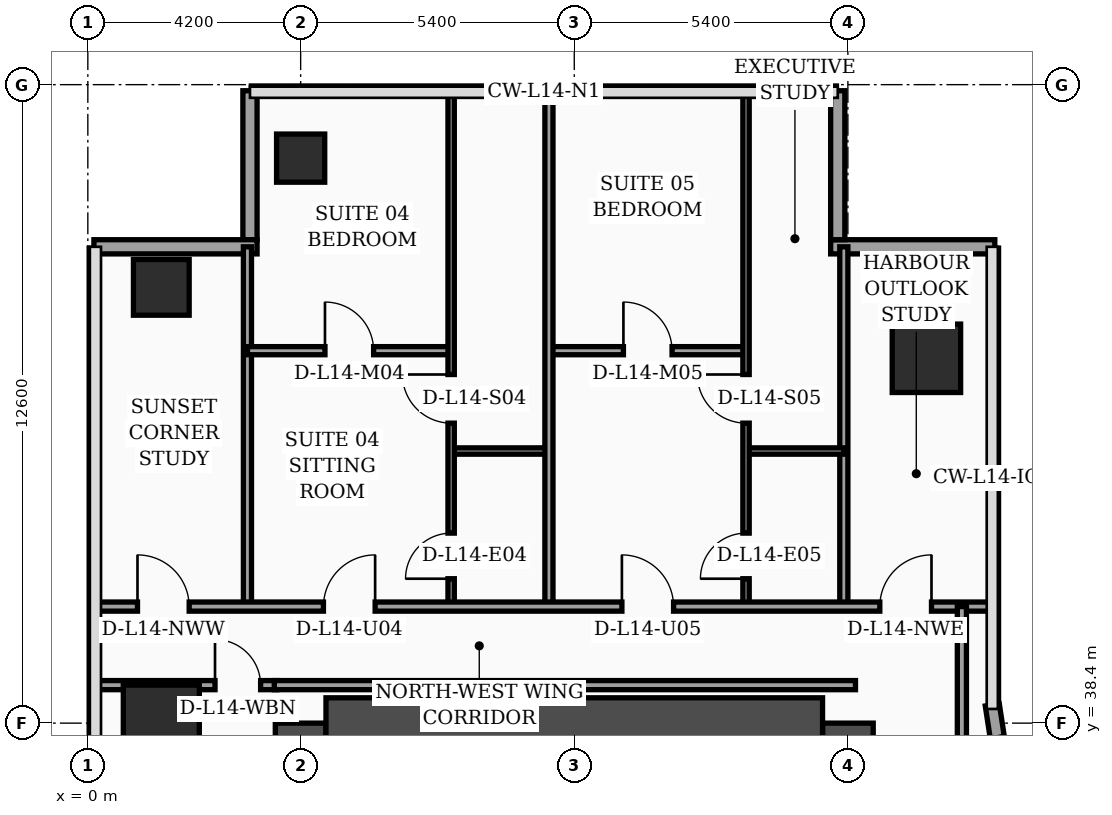
"""IFC4 building model, lengths in metres.
Left out: names, types, materials, properties, quantities, classifications, styles, units other than length and angle.
Written with IfcOpenShell. Run it as: python <this file> out.ifc"""

import sys

from ifc_helpers import new_model, si_unit, direction, frame, frame_2d, origin, origin_2d, place, context, subcontext, project, spatial, rectangle, hollow_rectangle, extrude, element, fill, save


model = new_model("IFC4")
c1 = context("Model", 3, precision=1e-05, world=origin(), true_north=direction((0.0, 1.0)))
c2 = subcontext(c1, "Body", "Model", "MODEL_VIEW")
j1 = project(units=[si_unit("LENGTHUNIT", "METRE"), si_unit("PLANEANGLEUNIT", "RADIAN")], contexts=[c1])
p1 = place(None, origin())
s1 = spatial("IfcSite", under=j1, at=p1, CompositionType="ELEMENT")
p2 = place(p1, origin())
s2 = spatial("IfcBuilding", under=s1, at=p2, CompositionType="ELEMENT")
p3 = place(p2, frame((0.0, 0.0, 62.2)))
s3 = spatial("IfcBuildingStorey", under=s2, at=p3, CompositionType="ELEMENT", Elevation=62.2)
p4 = place(p3, frame((4.2, 16.8, 0.0), z_axis=(0.0, 0.0, 1.0), x_axis=(0.0, 1.0, 0.0)))
e1 = element("IfcWall", 1, at=p4, inside=s3, PredefinedType="SHEAR", context=c2, shape_type="SweptSolid", body=[
    extrude(rectangle(XDim=21.6, YDim=1.0, at=frame_2d((10.8, 0.0))), origin(), (0.0, 0.0, 1.0), 3.56),
])
p5 = place(p3, frame((15.0, 16.8, 0.0), z_axis=(0.0, 0.0, 1.0), x_axis=(0.0, 1.0, 0.0)))
e2 = element("IfcWall", 2, at=p5, inside=s3, PredefinedType="SHEAR", context=c2, shape_type="SweptSolid", body=[
    extrude(rectangle(XDim=21.6, YDim=1.0, at=frame_2d((10.8, 0.0))), origin(), (0.0, 0.0, 1.0), 3.56),
])
p6 = place(p5, frame((8.65, 0.0, 0.0)))
e3 = element("IfcOpeningElement", 3, at=p6, cuts=e2, PredefinedType="OPENING", context=c2, shape_type="SweptSolid", body=[
    extrude(rectangle(XDim=1.1, YDim=2.2, at=frame_2d((0.55, 1.1))), frame((0.0, 0.51, 0.0), z_axis=(0.0, -1.0, 0.0), x_axis=(1.0, 0.0, 0.0)), (0.0, 0.0, 1.0), 1.02),
])
p7 = place(p5, frame((1.25, 0.0, 0.0)))
e4 = element("IfcOpeningElement", 4, at=p7, cuts=e2, PredefinedType="OPENING", context=c2, shape_type="SweptSolid", body=[
    extrude(rectangle(XDim=1.1, YDim=2.2, at=frame_2d((0.55, 1.1))), frame((0.0, 0.51, 0.0), z_axis=(0.0, -1.0, 0.0), x_axis=(1.0, 0.0, 0.0)), (0.0, 0.0, 1.0), 1.02),
])
p8 = place(p5, frame((3.8, 0.0, 0.0)))
e5 = element("IfcOpeningElement", 5, at=p8, cuts=e2, PredefinedType="OPENING", context=c2, shape_type="SweptSolid", body=[
    extrude(rectangle(XDim=1.1, YDim=2.2, at=frame_2d((0.55, 1.1))), frame((0.0, 0.51, 0.0), z_axis=(0.0, -1.0, 0.0), x_axis=(1.0, 0.0, 0.0)), (0.0, 0.0, 1.0), 1.02),
])
p9 = place(p5, frame((6.35, 0.0, 0.0)))
e6 = element("IfcOpeningElement", 6, at=p9, cuts=e2, PredefinedType="OPENING", context=c2, shape_type="SweptSolid", body=[
    extrude(rectangle(XDim=1.1, YDim=2.2, at=frame_2d((0.55, 1.1))), frame((0.0, 0.51, 0.0), z_axis=(0.0, -1.0, 0.0), x_axis=(1.0, 0.0, 0.0)), (0.0, 0.0, 1.0), 1.02),
])
p10 = place(p3, frame((4.7, 38.4, 0.0), z_axis=(0.0, 0.0, 1.0), x_axis=(1.0, 0.0, 0.0)))
e7 = element("IfcWall", 7, at=p10, inside=s3, PredefinedType="SHEAR", context=c2, shape_type="SweptSolid", body=[
    extrude(rectangle(XDim=9.8, YDim=1.0, at=frame_2d((4.9, 0.0))), origin(), (0.0, 0.0, 1.0), 3.56),
])
p11 = place(p3, frame((1.45, 38.4, 0.0), z_axis=(0.0, 0.0, 1.0), x_axis=(1.0, 0.0, 0.0)))
e8 = element("IfcColumn", 8, at=p11, inside=s3, PredefinedType="COLUMN", context=c2, shape_type="SweptSolid", body=[
    extrude(rectangle(XDim=1.5, YDim=1.5, at=origin_2d()), origin(), (0.0, 0.0, 1.0), 3.56),
])
p12 = place(p3, frame((1.45, 47.0, 0.0), z_axis=(0.0, 0.0, 1.0), x_axis=(1.0, 0.0, 0.0)))
e9 = element("IfcColumn", 9, at=p12, inside=s3, PredefinedType="COLUMN", context=c2, shape_type="SweptSolid", body=[
    extrude(hollow_rectangle(XDim=1.1, YDim=1.1, WallThickness=0.045, at=origin_2d()), origin(), (0.0, 0.0, 1.0), 3.56),
])
p13 = place(p3, frame((4.2, 49.55, 0.0), z_axis=(0.0, 0.0, 1.0), x_axis=(1.0, 0.0, 0.0)))
e10 = element("IfcColumn", 10, at=p13, inside=s3, PredefinedType="COLUMN", context=c2, shape_type="SweptSolid", body=[
    extrude(hollow_rectangle(XDim=0.95, YDim=0.95, WallThickness=0.04, at=origin_2d()), origin(), (0.0, 0.0, 1.0), 3.56),
])
p14 = place(p3, frame((16.55, 45.6, 0.0), z_axis=(0.0, 0.0, 1.0), x_axis=(1.0, 0.0, 0.0)))
e11 = element("IfcColumn", 11, at=p14, inside=s3, PredefinedType="COLUMN", context=c2, shape_type="SweptSolid", body=[
    extrude(rectangle(XDim=1.35, YDim=1.35, at=origin_2d()), origin(), (0.0, 0.0, 1.0), 3.56),
])
p15 = place(p3, frame((17.962, 38.03, 0.0), z_axis=(0.0, 0.0, 1.0), x_axis=(-0.15141125477, 0.988470855377, 0.0)))
e12 = element("IfcWall", 12, at=p15, inside=s3, PredefinedType="SOLIDWALL", context=c2, shape_type="SweptSolid", body=[
    extrude(rectangle(XDim=0.739, YDim=0.28, at=frame_2d((0.369, 0.0))), origin(), (0.0, 0.0, 1.0), 3.56),
])
p16 = place(p3, frame((17.9, 47.8, 0.0), z_axis=(0.0, 0.0, 1.0), x_axis=(-1.0, 0.0, 0.0)))
e13 = element("IfcWall", 13, at=p16, inside=s3, PredefinedType="SOLIDWALL", context=c2, shape_type="SweptSolid", body=[
    extrude(rectangle(XDim=3.24, YDim=0.28, at=frame_2d((1.62, 0.0))), origin(), (0.0, 0.0, 1.0), 3.56),
])
p17 = place(p3, frame((14.8, 47.94, 0.0), z_axis=(0.0, 0.0, 1.0), x_axis=(0.0, 1.0, 0.0)))
e14 = element("IfcWall", 14, at=p17, inside=s3, PredefinedType="SOLIDWALL", context=c2, shape_type="SweptSolid", body=[
    extrude(rectangle(XDim=2.94, YDim=0.28, at=frame_2d((1.47, 0.0))), origin(), (0.0, 0.0, 1.0), 3.56),
])
p18 = place(p3, frame((3.2, 50.88, 0.0), z_axis=(0.0, 0.0, 1.0), x_axis=(0.0, -1.0, 0.0)))
e15 = element("IfcWall", 15, at=p18, inside=s3, PredefinedType="SOLIDWALL", context=c2, shape_type="SweptSolid", body=[
    extrude(rectangle(XDim=2.94, YDim=0.28, at=frame_2d((1.47, 0.0))), origin(), (0.0, 0.0, 1.0), 3.04),
])
p19 = place(p3, frame((3.34, 47.8, 0.0), z_axis=(0.0, 0.0, 1.0), x_axis=(-1.0, 0.0, 0.0)))
e16 = element("IfcWall", 16, at=p19, inside=s3, PredefinedType="SOLIDWALL", context=c2, shape_type="SweptSolid", body=[
    extrude(rectangle(XDim=3.22, YDim=0.28, at=frame_2d((1.61, 0.0))), origin(), (0.0, 0.0, 1.0), 3.04),
])
p20 = place(p3, frame((0.08, 39.15, 0.0), z_axis=(0.0, 0.0, 1.0), x_axis=(1.0, 0.0, 0.0)))
e17 = element("IfcWall", 17, at=p20, inside=s3, PredefinedType="PARTITIONING", context=c2, shape_type="SweptSolid", body=[
    extrude(rectangle(XDim=3.65, YDim=0.18, at=frame_2d((1.825, 0.0))), origin(), (0.0, 0.0, 1.0), 2.84),
])
p21 = place(p20, frame((2.43, 0.0, 0.0)))
e18 = element("IfcOpeningElement", 18, at=p21, cuts=e17, PredefinedType="OPENING", context=c2, shape_type="SweptSolid", body=[
    extrude(rectangle(XDim=0.9, YDim=2.15, at=frame_2d((0.45, 1.075))), frame((0.0, 0.1, 0.0), z_axis=(0.0, -1.0, 0.0), x_axis=(1.0, 0.0, 0.0)), (0.0, 0.0, 1.0), 0.2),
])
p22 = place(p3, frame((3.15, 40.7, 0.0), z_axis=(0.0, 0.0, 1.0), x_axis=(0.0, 1.0, 0.0)))
e19 = element("IfcWall", 19, at=p22, inside=s3, PredefinedType="PARTITIONING", context=c2, shape_type="SweptSolid", body=[
    extrude(rectangle(XDim=7.1, YDim=0.16, at=frame_2d((3.55, 0.0))), origin(), (0.0, 0.0, 1.0), 3.14),
])
p23 = place(p3, frame((14.92, 40.7, 0.0), z_axis=(0.0, 0.0, 1.0), x_axis=(0.0, 1.0, 0.0)))
e20 = element("IfcWall", 20, at=p23, inside=s3, PredefinedType="PARTITIONING", context=c2, shape_type="SweptSolid", body=[
    extrude(rectangle(XDim=7.1, YDim=0.16, at=frame_2d((3.55, 0.0))), origin(), (0.0, 0.0, 1.0), 3.04),
])
p24 = place(p3, frame((7.17, 43.77, 0.0), z_axis=(0.0, 0.0, 1.0), x_axis=(1.0, 0.0, 0.0)))
e21 = element("IfcWall", 21, at=p24, inside=s3, PredefinedType="PARTITIONING", context=c2, shape_type="SweptSolid", body=[
    extrude(rectangle(XDim=1.93, YDim=0.125, at=frame_2d((0.965, 0.0))), origin(), (0.0, 0.0, 1.0), 3.56),
])
p25 = place(p3, frame((3.15, 45.75, 0.0), z_axis=(0.0, 0.0, 1.0), x_axis=(1.0, 0.0, 0.0)))
e22 = element("IfcWall", 22, at=p25, inside=s3, PredefinedType="PARTITIONING", context=c2, shape_type="SweptSolid", body=[
    extrude(rectangle(XDim=4.02, YDim=0.16, at=frame_2d((2.01, 0.0))), origin(), (0.0, 0.0, 1.0), 2.84),
])
p26 = place(p25, frame((1.53, 0.0, 0.0)))
e23 = element("IfcOpeningElement", 23, at=p26, cuts=e22, PredefinedType="OPENING", context=c2, shape_type="SweptSolid", body=[
    extrude(rectangle(XDim=0.96, YDim=2.2, at=frame_2d((0.48, 1.1))), frame((0.0, 0.09, 0.0), z_axis=(0.0, -1.0, 0.0), x_axis=(1.0, 0.0, 0.0)), (0.0, 0.0, 1.0), 0.18),
])
p27 = place(p3, frame((7.17, 40.7, 0.0), z_axis=(0.0, 0.0, 1.0), x_axis=(0.0, 1.0, 0.0)))
e24 = element("IfcWall", 24, at=p27, inside=s3, PredefinedType="PARTITIONING", context=c2, shape_type="SweptSolid", body=[
    extrude(rectangle(XDim=10.24, YDim=0.125, at=frame_2d((5.12, 0.0))), origin(), (0.0, 0.0, 1.0), 3.04),
])
p28 = place(p27, frame((0.55, 0.0, 0.0)))
e25 = element("IfcOpeningElement", 25, at=p28, cuts=e24, PredefinedType="OPENING", context=c2, shape_type="SweptSolid", body=[
    extrude(rectangle(XDim=0.9, YDim=2.15, at=frame_2d((0.45, 1.075))), frame((0.0, 0.073, 0.0), z_axis=(0.0, -1.0, 0.0), x_axis=(1.0, 0.0, 0.0)), (0.0, 0.0, 1.0), 0.145),
])
p29 = place(p27, frame((3.62, 0.0, 0.0)))
e26 = element("IfcOpeningElement", 26, at=p29, cuts=e24, PredefinedType="OPENING", context=c2, shape_type="SweptSolid", body=[
    extrude(rectangle(XDim=0.96, YDim=2.2, at=frame_2d((0.48, 1.1))), frame((0.0, 0.073, 0.0), z_axis=(0.0, -1.0, 0.0), x_axis=(1.0, 0.0, 0.0)), (0.0, 0.0, 1.0), 0.145),
])
p30 = place(p3, frame((12.99, 43.77, 0.0), z_axis=(0.0, 0.0, 1.0), x_axis=(1.0, 0.0, 0.0)))
e27 = element("IfcWall", 27, at=p30, inside=s3, PredefinedType="PARTITIONING", context=c2, shape_type="SweptSolid", body=[
    extrude(rectangle(XDim=1.93, YDim=0.125, at=frame_2d((0.965, 0.0))), origin(), (0.0, 0.0, 1.0), 3.56),
])
p31 = place(p3, frame((9.1, 45.75, 0.0), z_axis=(0.0, 0.0, 1.0), x_axis=(1.0, 0.0, 0.0)))
e28 = element("IfcWall", 28, at=p31, inside=s3, PredefinedType="PARTITIONING", context=c2, shape_type="SweptSolid", body=[
    extrude(rectangle(XDim=3.89, YDim=0.16, at=frame_2d((1.945, 0.0))), origin(), (0.0, 0.0, 1.0), 3.56),
])
p32 = place(p31, frame((1.47, 0.0, 0.0)))
e29 = element("IfcOpeningElement", 29, at=p32, cuts=e28, PredefinedType="OPENING", context=c2, shape_type="SweptSolid", body=[
    extrude(rectangle(XDim=0.96, YDim=2.2, at=frame_2d((0.48, 1.1))), frame((0.0, 0.09, 0.0), z_axis=(0.0, -1.0, 0.0), x_axis=(1.0, 0.0, 0.0)), (0.0, 0.0, 1.0), 0.18),
])
p33 = place(p3, frame((12.99, 40.7, 0.0), z_axis=(0.0, 0.0, 1.0), x_axis=(0.0, 1.0, 0.0)))
e30 = element("IfcWall", 30, at=p33, inside=s3, PredefinedType="PARTITIONING", context=c2, shape_type="SweptSolid", body=[
    extrude(rectangle(XDim=10.24, YDim=0.125, at=frame_2d((5.12, 0.0))), origin(), (0.0, 0.0, 1.0), 3.04),
])
p34 = place(p33, frame((0.55, 0.0, 0.0)))
e31 = element("IfcOpeningElement", 31, at=p34, cuts=e30, PredefinedType="OPENING", context=c2, shape_type="SweptSolid", body=[
    extrude(rectangle(XDim=0.9, YDim=2.15, at=frame_2d((0.45, 1.075))), frame((0.0, 0.073, 0.0), z_axis=(0.0, -1.0, 0.0), x_axis=(1.0, 0.0, 0.0)), (0.0, 0.0, 1.0), 0.145),
])
p35 = place(p33, frame((3.62, 0.0, 0.0)))
e32 = element("IfcOpeningElement", 32, at=p35, cuts=e30, PredefinedType="OPENING", context=c2, shape_type="SweptSolid", body=[
    extrude(rectangle(XDim=0.96, YDim=2.2, at=frame_2d((0.48, 1.1))), frame((0.0, 0.073, 0.0), z_axis=(0.0, -1.0, 0.0), x_axis=(1.0, 0.0, 0.0)), (0.0, 0.0, 1.0), 0.145),
])
p36 = place(p3, frame((9.1, 40.7, 0.0), z_axis=(0.0, 0.0, 1.0), x_axis=(0.0, 1.0, 0.0)))
e33 = element("IfcWall", 33, at=p36, inside=s3, PredefinedType="PARTITIONING", context=c2, shape_type="SweptSolid", body=[
    extrude(rectangle(XDim=10.24, YDim=0.16, at=frame_2d((5.12, 0.0))), origin(), (0.0, 0.0, 1.0), 3.04),
])
p37 = place(p3, frame((0.08, 40.7, 0.0), z_axis=(0.0, 0.0, 1.0), x_axis=(1.0, 0.0, 0.0)))
e34 = element("IfcWall", 34, at=p37, inside=s3, PredefinedType="PARTITIONING", context=c2, shape_type="SweptSolid", body=[
    extrude(rectangle(XDim=17.77, YDim=0.18, at=frame_2d((8.885, 0.0))), origin(), (0.0, 0.0, 1.0), 2.84),
])
p38 = place(p37, frame((0.9, 0.0, 0.0)))
e35 = element("IfcOpeningElement", 35, at=p38, cuts=e34, PredefinedType="OPENING", context=c2, shape_type="SweptSolid", body=[
    extrude(rectangle(XDim=1.02, YDim=2.2, at=frame_2d((0.51, 1.1))), frame((0.0, 0.1, 0.0), z_axis=(0.0, -1.0, 0.0), x_axis=(1.0, 0.0, 0.0)), (0.0, 0.0, 1.0), 0.2),
])
p39 = place(p37, frame((4.57, 0.0, 0.0)))
e36 = element("IfcOpeningElement", 36, at=p39, cuts=e34, PredefinedType="OPENING", context=c2, shape_type="SweptSolid", body=[
    extrude(rectangle(XDim=1.02, YDim=2.2, at=frame_2d((0.51, 1.1))), frame((0.0, 0.1, 0.0), z_axis=(0.0, -1.0, 0.0), x_axis=(1.0, 0.0, 0.0)), (0.0, 0.0, 1.0), 0.2),
])
p40 = place(p37, frame((10.46, 0.0, 0.0)))
e37 = element("IfcOpeningElement", 37, at=p40, cuts=e34, PredefinedType="OPENING", context=c2, shape_type="SweptSolid", body=[
    extrude(rectangle(XDim=1.02, YDim=2.2, at=frame_2d((0.51, 1.1))), frame((0.0, 0.1, 0.0), z_axis=(0.0, -1.0, 0.0), x_axis=(1.0, 0.0, 0.0)), (0.0, 0.0, 1.0), 0.2),
])
p41 = place(p37, frame((15.55, 0.0, 0.0)))
e38 = element("IfcOpeningElement", 38, at=p41, cuts=e34, PredefinedType="OPENING", context=c2, shape_type="SweptSolid", body=[
    extrude(rectangle(XDim=1.02, YDim=2.2, at=frame_2d((0.51, 1.1))), frame((0.0, 0.1, 0.0), z_axis=(0.0, -1.0, 0.0), x_axis=(1.0, 0.0, 0.0)), (0.0, 0.0, 1.0), 0.2),
])
p42 = place(p3, frame((17.25, 24.3, 0.0), z_axis=(0.0, 0.0, 1.0), x_axis=(0.0, 1.0, 0.0)))
e39 = element("IfcWall", 39, at=p42, inside=s3, PredefinedType="PARTITIONING", context=c2, shape_type="SweptSolid", body=[
    extrude(rectangle(XDim=16.4, YDim=0.18, at=frame_2d((8.2, 0.0))), origin(), (0.0, 0.0, 1.0), 2.84),
])
p43 = place(p3, frame((3.68, 39.15, 0.0), z_axis=(0.0, 0.0, 1.0), x_axis=(1.0, 0.0, 0.0)))
e40 = element("IfcWall", 40, at=p43, inside=s3, PredefinedType="PARTITIONING", context=c2, shape_type="SweptSolid", body=[
    extrude(rectangle(XDim=11.47, YDim=0.18, at=frame_2d((5.735, 0.0))), origin(), (0.0, 0.0, 1.0), 2.84),
])
p44 = place(p21, origin())
e41 = element("IfcDoor", 41, at=p44, inside=s3, OperationType="SINGLE_SWING_LEFT", PredefinedType="DOOR", context=c2, shape_type="SweptSolid", body=[
    extrude(rectangle(XDim=0.9, YDim=2.15, at=frame_2d((0.45, 1.075))), frame((0.0, 0.025, 0.0), z_axis=(0.0, -1.0, 0.0), x_axis=(1.0, 0.0, 0.0)), (0.0, 0.0, 1.0), 0.05),
])
fill(e18, e41)
p45 = place(p26, origin())
e42 = element("IfcDoor", 42, at=p45, inside=s3, OperationType="SINGLE_SWING_LEFT", PredefinedType="DOOR", context=c2, shape_type="SweptSolid", body=[
    extrude(rectangle(XDim=0.96, YDim=2.2, at=frame_2d((0.48, 1.1))), frame((0.0, 0.025, 0.0), z_axis=(0.0, -1.0, 0.0), x_axis=(1.0, 0.0, 0.0)), (0.0, 0.0, 1.0), 0.05),
])
fill(e23, e42)
p46 = place(p28, origin())
e43 = element("IfcDoor", 43, at=p46, inside=s3, OperationType="SINGLE_SWING_LEFT", PredefinedType="DOOR", context=c2, shape_type="SweptSolid", body=[
    extrude(rectangle(XDim=0.9, YDim=2.15, at=frame_2d((0.45, 1.075))), frame((0.0, 0.025, 0.0), z_axis=(0.0, -1.0, 0.0), x_axis=(1.0, 0.0, 0.0)), (0.0, 0.0, 1.0), 0.05),
])
fill(e25, e43)
p47 = place(p29, origin())
e44 = element("IfcDoor", 44, at=p47, inside=s3, OperationType="SINGLE_SWING_RIGHT", PredefinedType="DOOR", context=c2, shape_type="SweptSolid", body=[
    extrude(rectangle(XDim=0.96, YDim=2.2, at=frame_2d((0.48, 1.1))), frame((0.0, 0.025, 0.0), z_axis=(0.0, -1.0, 0.0), x_axis=(1.0, 0.0, 0.0)), (0.0, 0.0, 1.0), 0.05),
])
fill(e26, e44)
p48 = place(p32, origin())
e45 = element("IfcDoor", 45, at=p48, inside=s3, OperationType="SINGLE_SWING_LEFT", PredefinedType="DOOR", context=c2, shape_type="SweptSolid", body=[
    extrude(rectangle(XDim=0.96, YDim=2.2, at=frame_2d((0.48, 1.1))), frame((0.0, 0.025, 0.0), z_axis=(0.0, -1.0, 0.0), x_axis=(1.0, 0.0, 0.0)), (0.0, 0.0, 1.0), 0.05),
])
fill(e29, e45)
p49 = place(p34, origin())
e46 = element("IfcDoor", 46, at=p49, inside=s3, OperationType="SINGLE_SWING_LEFT", PredefinedType="DOOR", context=c2, shape_type="SweptSolid", body=[
    extrude(rectangle(XDim=0.9, YDim=2.15, at=frame_2d((0.45, 1.075))), frame((0.0, 0.025, 0.0), z_axis=(0.0, -1.0, 0.0), x_axis=(1.0, 0.0, 0.0)), (0.0, 0.0, 1.0), 0.05),
])
fill(e31, e46)
p50 = place(p35, origin())
e47 = element("IfcDoor", 47, at=p50, inside=s3, OperationType="SINGLE_SWING_RIGHT", PredefinedType="DOOR", context=c2, shape_type="SweptSolid", body=[
    extrude(rectangle(XDim=0.96, YDim=2.2, at=frame_2d((0.48, 1.1))), frame((0.0, 0.025, 0.0), z_axis=(0.0, -1.0, 0.0), x_axis=(1.0, 0.0, 0.0)), (0.0, 0.0, 1.0), 0.05),
])
fill(e32, e47)
p51 = place(p38, origin())
e48 = element("IfcDoor", 48, at=p51, inside=s3, OperationType="SINGLE_SWING_LEFT", PredefinedType="DOOR", context=c2, shape_type="SweptSolid", body=[
    extrude(rectangle(XDim=1.02, YDim=2.2, at=frame_2d((0.51, 1.1))), frame((0.0, 0.025, 0.0), z_axis=(0.0, -1.0, 0.0), x_axis=(1.0, 0.0, 0.0)), (0.0, 0.0, 1.0), 0.05),
])
fill(e35, e48)
p52 = place(p39, origin())
e49 = element("IfcDoor", 49, at=p52, inside=s3, OperationType="SINGLE_SWING_RIGHT", PredefinedType="DOOR", context=c2, shape_type="SweptSolid", body=[
    extrude(rectangle(XDim=1.02, YDim=2.2, at=frame_2d((0.51, 1.1))), frame((0.0, 0.025, 0.0), z_axis=(0.0, -1.0, 0.0), x_axis=(1.0, 0.0, 0.0)), (0.0, 0.0, 1.0), 0.05),
])
fill(e36, e49)
p53 = place(p40, origin())
e50 = element("IfcDoor", 50, at=p53, inside=s3, OperationType="SINGLE_SWING_LEFT", PredefinedType="DOOR", context=c2, shape_type="SweptSolid", body=[
    extrude(rectangle(XDim=1.02, YDim=2.2, at=frame_2d((0.51, 1.1))), frame((0.0, 0.025, 0.0), z_axis=(0.0, -1.0, 0.0), x_axis=(1.0, 0.0, 0.0)), (0.0, 0.0, 1.0), 0.05),
])
fill(e37, e50)
p54 = place(p41, origin())
e51 = element("IfcDoor", 51, at=p54, inside=s3, OperationType="SINGLE_SWING_RIGHT", PredefinedType="DOOR", context=c2, shape_type="SweptSolid", body=[
    extrude(rectangle(XDim=1.02, YDim=2.2, at=frame_2d((0.51, 1.1))), frame((0.0, 0.025, 0.0), z_axis=(0.0, -1.0, 0.0), x_axis=(1.0, 0.0, 0.0)), (0.0, 0.0, 1.0), 0.05),
])
fill(e38, e51)
save(model, sys.argv[1])
